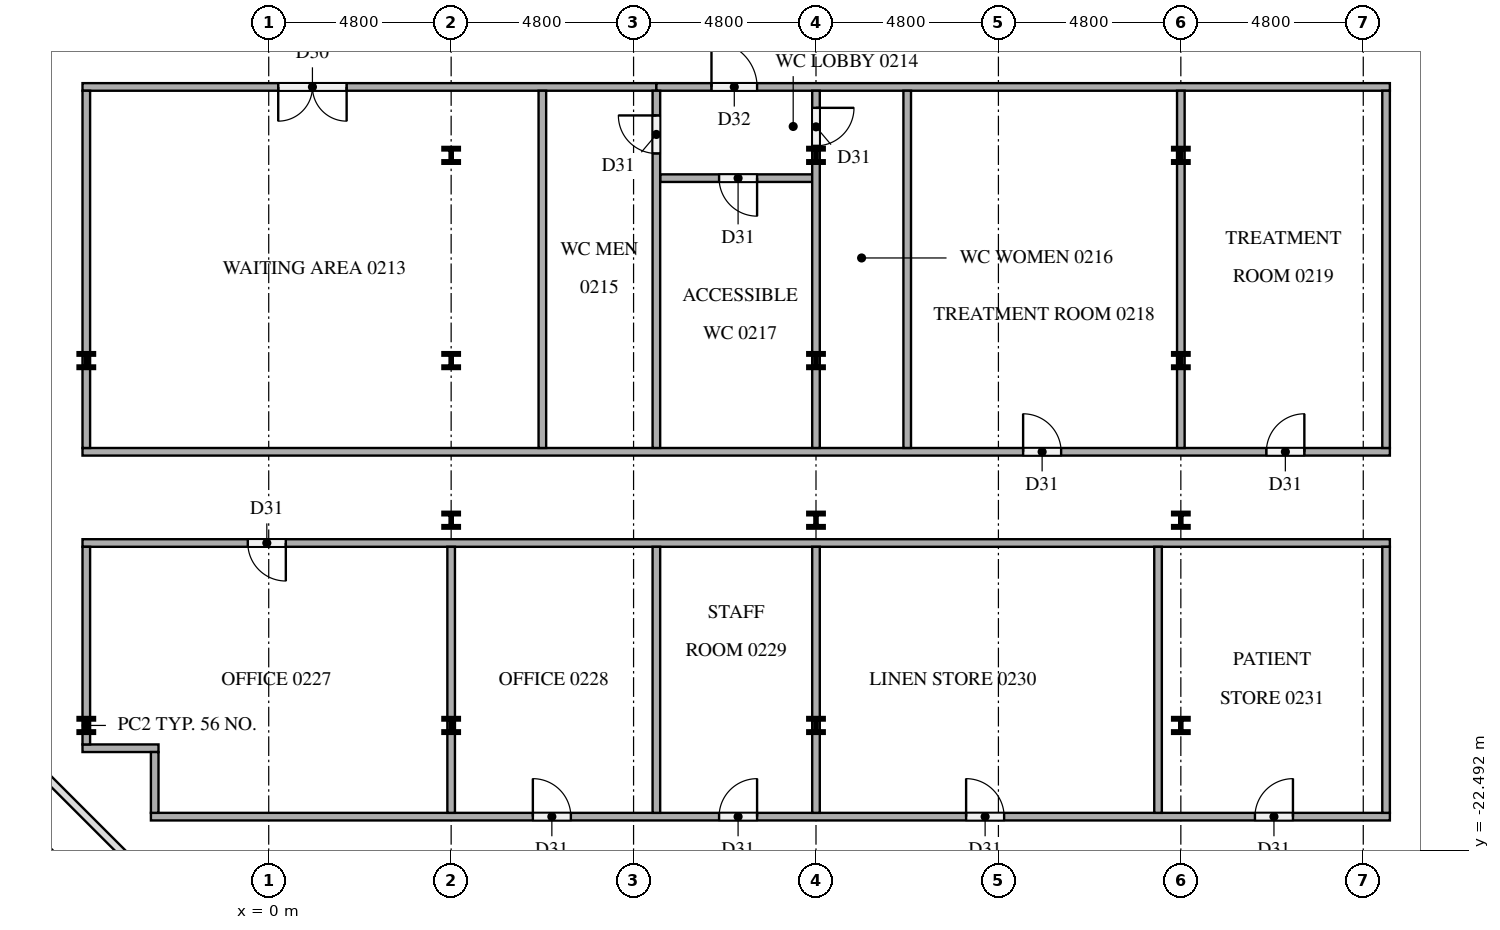
"""IFC4 building model, lengths in metres.
Left out: names, types, materials, properties, quantities, classifications, styles, units other than length and angle.
Written with IfcOpenShell. Run it as: python <this file> out.ifc"""

import sys

from ifc_helpers import new_model, si_unit, direction, frame, frame_2d, origin, origin_2d, place, context, subcontext, project, spatial, rectangle, i_section, extrude, element, fill, save


model = new_model("IFC4")
c1 = context("Model", 3, precision=1e-05, world=origin(), true_north=direction((0.0, 1.0)))
c2 = subcontext(c1, "Body", "Model", "MODEL_VIEW")
j1 = project(units=[si_unit("LENGTHUNIT", "METRE"), si_unit("PLANEANGLEUNIT", "RADIAN")], contexts=[c1])
p1 = place(None, origin())
s1 = spatial("IfcSite", under=j1, at=p1, CompositionType="ELEMENT")
p2 = place(p1, origin())
s2 = spatial("IfcBuilding", under=s1, at=p2, CompositionType="ELEMENT")
p3 = place(p2, frame((0.0, 0.0, 10.5)))
s3 = spatial("IfcBuildingStorey", under=s2, at=p3, CompositionType="ELEMENT", Elevation=10.5)
for number, where, z_axis, x_axis in (
    (1, (-4.8, -19.2, 0.0), (0.0, 0.0, 1.0), (1.0, 0.0, 0.0)),
    (2, (-4.8, -9.6, 0.0), (0.0, 0.0, 1.0), (1.0, 0.0, 0.0)),
    (3, (4.8, -19.2, 0.0), (0.0, 0.0, 1.0), (1.0, 0.0, 0.0)),
    (4, (4.8, -13.8, 0.0), (0.0, 0.0, 1.0), (1.0, 0.0, 0.0)),
    (5, (4.8, -9.6, 0.0), (0.0, 0.0, 1.0), (1.0, 0.0, 0.0)),
    (6, (4.8, -4.2, 0.0), (0.0, 0.0, 1.0), (1.0, 0.0, 0.0)),
    (7, (14.4, -19.2, 0.0), (0.0, 0.0, 1.0), (1.0, 0.0, 0.0)),
    (8, (14.4, -13.8, 0.0), (0.0, 0.0, 1.0), (1.0, 0.0, 0.0)),
    (9, (14.4, -9.6, 0.0), (0.0, 0.0, 1.0), (1.0, 0.0, 0.0)),
    (10, (14.4, -4.2, 0.0), (0.0, 0.0, 1.0), (1.0, 0.0, 0.0)),
    (11, (24.0, -19.2, 0.0), (0.0, 0.0, 1.0), (1.0, 0.0, 0.0)),
    (12, (24.0, -13.8, 0.0), (0.0, 0.0, 1.0), (1.0, 0.0, 0.0)),
    (13, (24.0, -9.6, 0.0), (0.0, 0.0, 1.0), (1.0, 0.0, 0.0)),
    (14, (24.0, -4.2, 0.0), (0.0, 0.0, 1.0), (1.0, 0.0, 0.0)),
):
    element("IfcColumn", number, at=place(p3, frame(where, z_axis=z_axis, x_axis=x_axis)), inside=s3, PredefinedType="COLUMN", context=c2, shape_type="SweptSolid", body=[
        extrude(i_section(OverallWidth=0.396, OverallDepth=0.381, WebThickness=0.019, FlangeThickness=0.03, at=origin_2d()), origin(), (0.0, 0.0, 1.0), 4.2),
    ])
p4 = place(p3, frame((-3.1, -21.6, 0.0), z_axis=(0.0, 0.0, 1.0), x_axis=(1.0, 0.0, 0.0)))
e15 = element("IfcWall", 15, at=p4, inside=s3, PredefinedType="PARTITIONING", context=c2, shape_type="SweptSolid", body=[
    extrude(rectangle(XDim=32.6, YDim=0.2, at=frame_2d((16.3, 0.0))), origin(), (0.0, 0.0, 1.0), 4.2),
])
p5 = place(p4, frame((10.05, 0.0, 0.0)))
e16 = element("IfcOpeningElement", 16, at=p5, cuts=e15, PredefinedType="OPENING", context=c2, shape_type="SweptSolid", body=[
    extrude(rectangle(XDim=1.0, YDim=2.1, at=frame_2d((0.5, 1.05))), frame((0.0, 0.11, 0.0), z_axis=(0.0, -1.0, 0.0), x_axis=(1.0, 0.0, 0.0)), (0.0, 0.0, 1.0), 0.22),
])
p6 = place(p4, frame((14.95, 0.0, 0.0)))
e17 = element("IfcOpeningElement", 17, at=p6, cuts=e15, PredefinedType="OPENING", context=c2, shape_type="SweptSolid", body=[
    extrude(rectangle(XDim=1.0, YDim=2.1, at=frame_2d((0.5, 1.05))), frame((0.0, 0.11, 0.0), z_axis=(0.0, -1.0, 0.0), x_axis=(1.0, 0.0, 0.0)), (0.0, 0.0, 1.0), 0.22),
])
p7 = place(p4, frame((21.45, 0.0, 0.0)))
e18 = element("IfcOpeningElement", 18, at=p7, cuts=e15, PredefinedType="OPENING", context=c2, shape_type="SweptSolid", body=[
    extrude(rectangle(XDim=1.0, YDim=2.1, at=frame_2d((0.5, 1.05))), frame((0.0, 0.11, 0.0), z_axis=(0.0, -1.0, 0.0), x_axis=(1.0, 0.0, 0.0)), (0.0, 0.0, 1.0), 0.22),
])
p8 = place(p4, frame((29.05, 0.0, 0.0)))
e19 = element("IfcOpeningElement", 19, at=p8, cuts=e15, PredefinedType="OPENING", context=c2, shape_type="SweptSolid", body=[
    extrude(rectangle(XDim=1.0, YDim=2.1, at=frame_2d((0.5, 1.05))), frame((0.0, 0.11, 0.0), z_axis=(0.0, -1.0, 0.0), x_axis=(1.0, 0.0, 0.0)), (0.0, 0.0, 1.0), 0.22),
])
p9 = place(p3, frame((-4.9, -19.8, 0.0), z_axis=(0.0, 0.0, 1.0), x_axis=(1.0, 0.0, 0.0)))
e20 = element("IfcWall", 20, at=p9, inside=s3, PredefinedType="PARTITIONING", context=c2, shape_type="SweptSolid", body=[
    extrude(rectangle(XDim=2.0, YDim=0.2, at=frame_2d((1.0, 0.0))), origin(), (0.0, 0.0, 1.0), 4.2),
])
p10 = place(p3, frame((29.5, -14.4, 0.0), z_axis=(0.0, 0.0, 1.0), x_axis=(-1.0, 0.0, 0.0)))
e21 = element("IfcWall", 21, at=p10, inside=s3, PredefinedType="PARTITIONING", context=c2, shape_type="SweptSolid", body=[
    extrude(rectangle(XDim=34.4, YDim=0.2, at=frame_2d((17.2, 0.0))), origin(), (0.0, 0.0, 1.0), 4.2),
])
p11 = place(p10, frame((29.05, 0.0, 0.0)))
e22 = element("IfcOpeningElement", 22, at=p11, cuts=e21, PredefinedType="OPENING", context=c2, shape_type="SweptSolid", body=[
    extrude(rectangle(XDim=1.0, YDim=2.1, at=frame_2d((0.5, 1.05))), frame((0.0, 0.11, 0.0), z_axis=(0.0, -1.0, 0.0), x_axis=(1.0, 0.0, 0.0)), (0.0, 0.0, 1.0), 0.22),
])
p12 = place(p3, frame((-4.9, -12.0, 0.0), z_axis=(0.0, 0.0, 1.0), x_axis=(1.0, 0.0, 0.0)))
e23 = element("IfcWall", 23, at=p12, inside=s3, PredefinedType="PARTITIONING", context=c2, shape_type="SweptSolid", body=[
    extrude(rectangle(XDim=34.4, YDim=0.2, at=frame_2d((17.2, 0.0))), origin(), (0.0, 0.0, 1.0), 4.2),
])
p13 = place(p12, frame((24.75, 0.0, 0.0)))
e24 = element("IfcOpeningElement", 24, at=p13, cuts=e23, PredefinedType="OPENING", context=c2, shape_type="SweptSolid", body=[
    extrude(rectangle(XDim=1.0, YDim=2.1, at=frame_2d((0.5, 1.05))), frame((0.0, 0.11, 0.0), z_axis=(0.0, -1.0, 0.0), x_axis=(1.0, 0.0, 0.0)), (0.0, 0.0, 1.0), 0.22),
])
p14 = place(p12, frame((31.15, 0.0, 0.0)))
e25 = element("IfcOpeningElement", 25, at=p14, cuts=e23, PredefinedType="OPENING", context=c2, shape_type="SweptSolid", body=[
    extrude(rectangle(XDim=1.0, YDim=2.1, at=frame_2d((0.5, 1.05))), frame((0.0, 0.11, 0.0), z_axis=(0.0, -1.0, 0.0), x_axis=(1.0, 0.0, 0.0)), (0.0, 0.0, 1.0), 0.22),
])
p15 = place(p3, frame((14.3, -4.8, 0.0), z_axis=(0.0, 0.0, 1.0), x_axis=(-1.0, 0.0, 0.0)))
e26 = element("IfcWall", 26, at=p15, inside=s3, PredefinedType="PARTITIONING", context=c2, shape_type="SweptSolid", body=[
    extrude(rectangle(XDim=4.0, YDim=0.2, at=frame_2d((2.0, 0.0))), origin(), (0.0, 0.0, 1.0), 4.2),
])
p16 = place(p15, frame((1.45, 0.0, 0.0)))
e27 = element("IfcOpeningElement", 27, at=p16, cuts=e26, PredefinedType="OPENING", context=c2, shape_type="SweptSolid", body=[
    extrude(rectangle(XDim=1.0, YDim=2.1, at=frame_2d((0.5, 1.05))), frame((0.0, 0.11, 0.0), z_axis=(0.0, -1.0, 0.0), x_axis=(1.0, 0.0, 0.0)), (0.0, 0.0, 1.0), 0.22),
])
p17 = place(p3, frame((10.2, -2.4, 0.0), z_axis=(0.0, 0.0, 1.0), x_axis=(-1.0, 0.0, 0.0)))
e28 = element("IfcWall", 28, at=p17, inside=s3, PredefinedType="PARTITIONING", context=c2, shape_type="SweptSolid", body=[
    extrude(rectangle(XDim=15.1, YDim=0.2, at=frame_2d((7.55, 0.0))), origin(), (0.0, 0.0, 1.0), 4.2),
])
p18 = place(p17, frame((8.15, 0.0, 0.0)))
e29 = element("IfcOpeningElement", 29, at=p18, cuts=e28, PredefinedType="OPENING", context=c2, shape_type="SweptSolid", body=[
    extrude(rectangle(XDim=1.8, YDim=2.1, at=frame_2d((0.9, 1.05))), frame((0.0, 0.11, 0.0), z_axis=(0.0, -1.0, 0.0), x_axis=(1.0, 0.0, 0.0)), (0.0, 0.0, 1.0), 0.22),
])
p19 = place(p3, frame((10.2, -2.4, 0.0), z_axis=(0.0, 0.0, 1.0), x_axis=(1.0, 0.0, 0.0)))
e30 = element("IfcWall", 30, at=p19, inside=s3, PredefinedType="PARTITIONING", context=c2, shape_type="SweptSolid", body=[
    extrude(rectangle(XDim=19.3, YDim=0.2, at=frame_2d((9.65, 0.0))), origin(), (0.0, 0.0, 1.0), 4.2),
])
p20 = place(p19, frame((1.45, 0.0, 0.0)))
e31 = element("IfcOpeningElement", 31, at=p20, cuts=e30, PredefinedType="OPENING", context=c2, shape_type="SweptSolid", body=[
    extrude(rectangle(XDim=1.2, YDim=2.1, at=frame_2d((0.6, 1.05))), frame((0.0, 0.11, 0.0), z_axis=(0.0, -1.0, 0.0), x_axis=(1.0, 0.0, 0.0)), (0.0, 0.0, 1.0), 0.22),
])
p21 = place(p3, frame((-4.8, -19.7, 0.0), z_axis=(0.0, 0.0, 1.0), x_axis=(0.0, 1.0, 0.0)))
e32 = element("IfcWall", 32, at=p21, inside=s3, PredefinedType="PARTITIONING", context=c2, shape_type="SweptSolid", body=[
    extrude(rectangle(XDim=5.2, YDim=0.2, at=frame_2d((2.6, 0.0))), origin(), (0.0, 0.0, 1.0), 4.2),
])
p22 = place(p3, frame((-4.8, -11.9, 0.0), z_axis=(0.0, 0.0, 1.0), x_axis=(0.0, 1.0, 0.0)))
e33 = element("IfcWall", 33, at=p22, inside=s3, PredefinedType="PARTITIONING", context=c2, shape_type="SweptSolid", body=[
    extrude(rectangle(XDim=9.4, YDim=0.2, at=frame_2d((4.7, 0.0))), origin(), (0.0, 0.0, 1.0), 4.2),
])
p23 = place(p3, frame((-3.0, -21.5, 0.0), z_axis=(0.0, 0.0, 1.0), x_axis=(0.0, 1.0, 0.0)))
e34 = element("IfcWall", 34, at=p23, inside=s3, PredefinedType="PARTITIONING", context=c2, shape_type="SweptSolid", body=[
    extrude(rectangle(XDim=1.6, YDim=0.2, at=frame_2d((0.8, 0.0))), origin(), (0.0, 0.0, 1.0), 4.2),
])
p24 = place(p3, frame((4.8, -21.5, 0.0), z_axis=(0.0, 0.0, 1.0), x_axis=(0.0, 1.0, 0.0)))
e35 = element("IfcWall", 35, at=p24, inside=s3, PredefinedType="PARTITIONING", context=c2, shape_type="SweptSolid", body=[
    extrude(rectangle(XDim=7.0, YDim=0.2, at=frame_2d((3.5, 0.0))), origin(), (0.0, 0.0, 1.0), 4.2),
])
p25 = place(p3, frame((7.2, -11.9, 0.0), z_axis=(0.0, 0.0, 1.0), x_axis=(0.0, 1.0, 0.0)))
e36 = element("IfcWall", 36, at=p25, inside=s3, PredefinedType="PARTITIONING", context=c2, shape_type="SweptSolid", body=[
    extrude(rectangle(XDim=9.4, YDim=0.2, at=frame_2d((4.7, 0.0))), origin(), (0.0, 0.0, 1.0), 4.2),
])
p26 = place(p3, frame((10.2, -21.5, 0.0), z_axis=(0.0, 0.0, 1.0), x_axis=(0.0, 1.0, 0.0)))
e37 = element("IfcWall", 37, at=p26, inside=s3, PredefinedType="PARTITIONING", context=c2, shape_type="SweptSolid", body=[
    extrude(rectangle(XDim=7.0, YDim=0.2, at=frame_2d((3.5, 0.0))), origin(), (0.0, 0.0, 1.0), 4.2),
])
p27 = place(p3, frame((10.2, -11.9, 0.0), z_axis=(0.0, 0.0, 1.0), x_axis=(0.0, 1.0, 0.0)))
e38 = element("IfcWall", 38, at=p27, inside=s3, PredefinedType="PARTITIONING", context=c2, shape_type="SweptSolid", body=[
    extrude(rectangle(XDim=9.4, YDim=0.2, at=frame_2d((4.7, 0.0))), origin(), (0.0, 0.0, 1.0), 4.2),
])
p28 = place(p27, frame((7.75, 0.0, 0.0)))
e39 = element("IfcOpeningElement", 39, at=p28, cuts=e38, PredefinedType="OPENING", context=c2, shape_type="SweptSolid", body=[
    extrude(rectangle(XDim=1.0, YDim=2.1, at=frame_2d((0.5, 1.05))), frame((0.0, 0.11, 0.0), z_axis=(0.0, -1.0, 0.0), x_axis=(1.0, 0.0, 0.0)), (0.0, 0.0, 1.0), 0.22),
])
p29 = place(p3, frame((14.4, -21.5, 0.0), z_axis=(0.0, 0.0, 1.0), x_axis=(0.0, 1.0, 0.0)))
e40 = element("IfcWall", 40, at=p29, inside=s3, PredefinedType="PARTITIONING", context=c2, shape_type="SweptSolid", body=[
    extrude(rectangle(XDim=7.0, YDim=0.2, at=frame_2d((3.5, 0.0))), origin(), (0.0, 0.0, 1.0), 4.2),
])
p30 = place(p3, frame((14.4, -2.5, 0.0), z_axis=(0.0, 0.0, 1.0), x_axis=(0.0, -1.0, 0.0)))
e41 = element("IfcWall", 41, at=p30, inside=s3, PredefinedType="PARTITIONING", context=c2, shape_type="SweptSolid", body=[
    extrude(rectangle(XDim=9.4, YDim=0.2, at=frame_2d((4.7, 0.0))), origin(), (0.0, 0.0, 1.0), 4.2),
])
p31 = place(p30, frame((0.45, 0.0, 0.0)))
e42 = element("IfcOpeningElement", 42, at=p31, cuts=e41, PredefinedType="OPENING", context=c2, shape_type="SweptSolid", body=[
    extrude(rectangle(XDim=1.0, YDim=2.1, at=frame_2d((0.5, 1.05))), frame((0.0, 0.11, 0.0), z_axis=(0.0, -1.0, 0.0), x_axis=(1.0, 0.0, 0.0)), (0.0, 0.0, 1.0), 0.22),
])
p32 = place(p3, frame((16.8, -11.9, 0.0), z_axis=(0.0, 0.0, 1.0), x_axis=(0.0, 1.0, 0.0)))
e43 = element("IfcWall", 43, at=p32, inside=s3, PredefinedType="PARTITIONING", context=c2, shape_type="SweptSolid", body=[
    extrude(rectangle(XDim=9.4, YDim=0.2, at=frame_2d((4.7, 0.0))), origin(), (0.0, 0.0, 1.0), 4.2),
])
p33 = place(p3, frame((23.4, -21.5, 0.0), z_axis=(0.0, 0.0, 1.0), x_axis=(0.0, 1.0, 0.0)))
e44 = element("IfcWall", 44, at=p33, inside=s3, PredefinedType="PARTITIONING", context=c2, shape_type="SweptSolid", body=[
    extrude(rectangle(XDim=7.0, YDim=0.2, at=frame_2d((3.5, 0.0))), origin(), (0.0, 0.0, 1.0), 4.2),
])
p34 = place(p3, frame((24.0, -11.9, 0.0), z_axis=(0.0, 0.0, 1.0), x_axis=(0.0, 1.0, 0.0)))
e45 = element("IfcWall", 45, at=p34, inside=s3, PredefinedType="PARTITIONING", context=c2, shape_type="SweptSolid", body=[
    extrude(rectangle(XDim=9.4, YDim=0.2, at=frame_2d((4.7, 0.0))), origin(), (0.0, 0.0, 1.0), 4.2),
])
p35 = place(p3, frame((29.4, -21.5, 0.0), z_axis=(0.0, 0.0, 1.0), x_axis=(0.0, 1.0, 0.0)))
e46 = element("IfcWall", 46, at=p35, inside=s3, PredefinedType="PARTITIONING", context=c2, shape_type="SweptSolid", body=[
    extrude(rectangle(XDim=7.0, YDim=0.2, at=frame_2d((3.5, 0.0))), origin(), (0.0, 0.0, 1.0), 4.2),
])
p36 = place(p3, frame((29.4, -11.9, 0.0), z_axis=(0.0, 0.0, 1.0), x_axis=(0.0, 1.0, 0.0)))
e47 = element("IfcWall", 47, at=p36, inside=s3, PredefinedType="PARTITIONING", context=c2, shape_type="SweptSolid", body=[
    extrude(rectangle(XDim=9.4, YDim=0.2, at=frame_2d((4.7, 0.0))), origin(), (0.0, 0.0, 1.0), 4.2),
])
p37 = place(p18, origin())
e48 = element("IfcDoor", 48, at=p37, inside=s3, OperationType="DOUBLE_DOOR_SINGLE_SWING", PredefinedType="DOOR", context=c2, shape_type="SweptSolid", body=[
    extrude(rectangle(XDim=1.8, YDim=2.1, at=frame_2d((0.9, 1.05))), frame((0.0, 0.025, 0.0), z_axis=(0.0, -1.0, 0.0), x_axis=(1.0, 0.0, 0.0)), (0.0, 0.0, 1.0), 0.05),
])
fill(e29, e48)
p38 = place(p20, origin())
e49 = element("IfcDoor", 49, at=p38, inside=s3, OperationType="SINGLE_SWING_LEFT", PredefinedType="DOOR", context=c2, shape_type="SweptSolid", body=[
    extrude(rectangle(XDim=1.2, YDim=2.1, at=frame_2d((0.6, 1.05))), frame((0.0, 0.025, 0.0), z_axis=(0.0, -1.0, 0.0), x_axis=(1.0, 0.0, 0.0)), (0.0, 0.0, 1.0), 0.05),
])
fill(e31, e49)
p39 = place(p28, origin())
e50 = element("IfcDoor", 50, at=p39, inside=s3, OperationType="SINGLE_SWING_RIGHT", PredefinedType="DOOR", context=c2, shape_type="SweptSolid", body=[
    extrude(rectangle(XDim=1.0, YDim=2.1, at=frame_2d((0.5, 1.05))), frame((0.0, 0.025, 0.0), z_axis=(0.0, -1.0, 0.0), x_axis=(1.0, 0.0, 0.0)), (0.0, 0.0, 1.0), 0.05),
])
fill(e39, e50)
p40 = place(p31, origin())
e51 = element("IfcDoor", 51, at=p40, inside=s3, OperationType="SINGLE_SWING_LEFT", PredefinedType="DOOR", context=c2, shape_type="SweptSolid", body=[
    extrude(rectangle(XDim=1.0, YDim=2.1, at=frame_2d((0.5, 1.05))), frame((0.0, 0.025, 0.0), z_axis=(0.0, -1.0, 0.0), x_axis=(1.0, 0.0, 0.0)), (0.0, 0.0, 1.0), 0.05),
])
fill(e42, e51)
p41 = place(p16, origin())
e52 = element("IfcDoor", 52, at=p41, inside=s3, OperationType="SINGLE_SWING_LEFT", PredefinedType="DOOR", context=c2, shape_type="SweptSolid", body=[
    extrude(rectangle(XDim=1.0, YDim=2.1, at=frame_2d((0.5, 1.05))), frame((0.0, 0.025, 0.0), z_axis=(0.0, -1.0, 0.0), x_axis=(1.0, 0.0, 0.0)), (0.0, 0.0, 1.0), 0.05),
])
fill(e27, e52)
p42 = place(p13, origin())
e53 = element("IfcDoor", 53, at=p42, inside=s3, OperationType="SINGLE_SWING_LEFT", PredefinedType="DOOR", context=c2, shape_type="SweptSolid", body=[
    extrude(rectangle(XDim=1.0, YDim=2.1, at=frame_2d((0.5, 1.05))), frame((0.0, 0.025, 0.0), z_axis=(0.0, -1.0, 0.0), x_axis=(1.0, 0.0, 0.0)), (0.0, 0.0, 1.0), 0.05),
])
fill(e24, e53)
p43 = place(p14, origin())
e54 = element("IfcDoor", 54, at=p43, inside=s3, OperationType="SINGLE_SWING_RIGHT", PredefinedType="DOOR", context=c2, shape_type="SweptSolid", body=[
    extrude(rectangle(XDim=1.0, YDim=2.1, at=frame_2d((0.5, 1.05))), frame((0.0, 0.025, 0.0), z_axis=(0.0, -1.0, 0.0), x_axis=(1.0, 0.0, 0.0)), (0.0, 0.0, 1.0), 0.05),
])
fill(e25, e54)
p44 = place(p11, origin())
e55 = element("IfcDoor", 55, at=p44, inside=s3, OperationType="SINGLE_SWING_LEFT", PredefinedType="DOOR", context=c2, shape_type="SweptSolid", body=[
    extrude(rectangle(XDim=1.0, YDim=2.1, at=frame_2d((0.5, 1.05))), frame((0.0, 0.025, 0.0), z_axis=(0.0, -1.0, 0.0), x_axis=(1.0, 0.0, 0.0)), (0.0, 0.0, 1.0), 0.05),
])
fill(e22, e55)
p45 = place(p5, origin())
e56 = element("IfcDoor", 56, at=p45, inside=s3, OperationType="SINGLE_SWING_LEFT", PredefinedType="DOOR", context=c2, shape_type="SweptSolid", body=[
    extrude(rectangle(XDim=1.0, YDim=2.1, at=frame_2d((0.5, 1.05))), frame((0.0, 0.025, 0.0), z_axis=(0.0, -1.0, 0.0), x_axis=(1.0, 0.0, 0.0)), (0.0, 0.0, 1.0), 0.05),
])
fill(e16, e56)
p46 = place(p6, origin())
e57 = element("IfcDoor", 57, at=p46, inside=s3, OperationType="SINGLE_SWING_RIGHT", PredefinedType="DOOR", context=c2, shape_type="SweptSolid", body=[
    extrude(rectangle(XDim=1.0, YDim=2.1, at=frame_2d((0.5, 1.05))), frame((0.0, 0.025, 0.0), z_axis=(0.0, -1.0, 0.0), x_axis=(1.0, 0.0, 0.0)), (0.0, 0.0, 1.0), 0.05),
])
fill(e17, e57)
p47 = place(p7, origin())
e58 = element("IfcDoor", 58, at=p47, inside=s3, OperationType="SINGLE_SWING_LEFT", PredefinedType="DOOR", context=c2, shape_type="SweptSolid", body=[
    extrude(rectangle(XDim=1.0, YDim=2.1, at=frame_2d((0.5, 1.05))), frame((0.0, 0.025, 0.0), z_axis=(0.0, -1.0, 0.0), x_axis=(1.0, 0.0, 0.0)), (0.0, 0.0, 1.0), 0.05),
])
fill(e18, e58)
p48 = place(p8, origin())
e59 = element("IfcDoor", 59, at=p48, inside=s3, OperationType="SINGLE_SWING_RIGHT", PredefinedType="DOOR", context=c2, shape_type="SweptSolid", body=[
    extrude(rectangle(XDim=1.0, YDim=2.1, at=frame_2d((0.5, 1.05))), frame((0.0, 0.025, 0.0), z_axis=(0.0, -1.0, 0.0), x_axis=(1.0, 0.0, 0.0)), (0.0, 0.0, 1.0), 0.05),
])
fill(e19, e59)
save(model, sys.argv[1])
